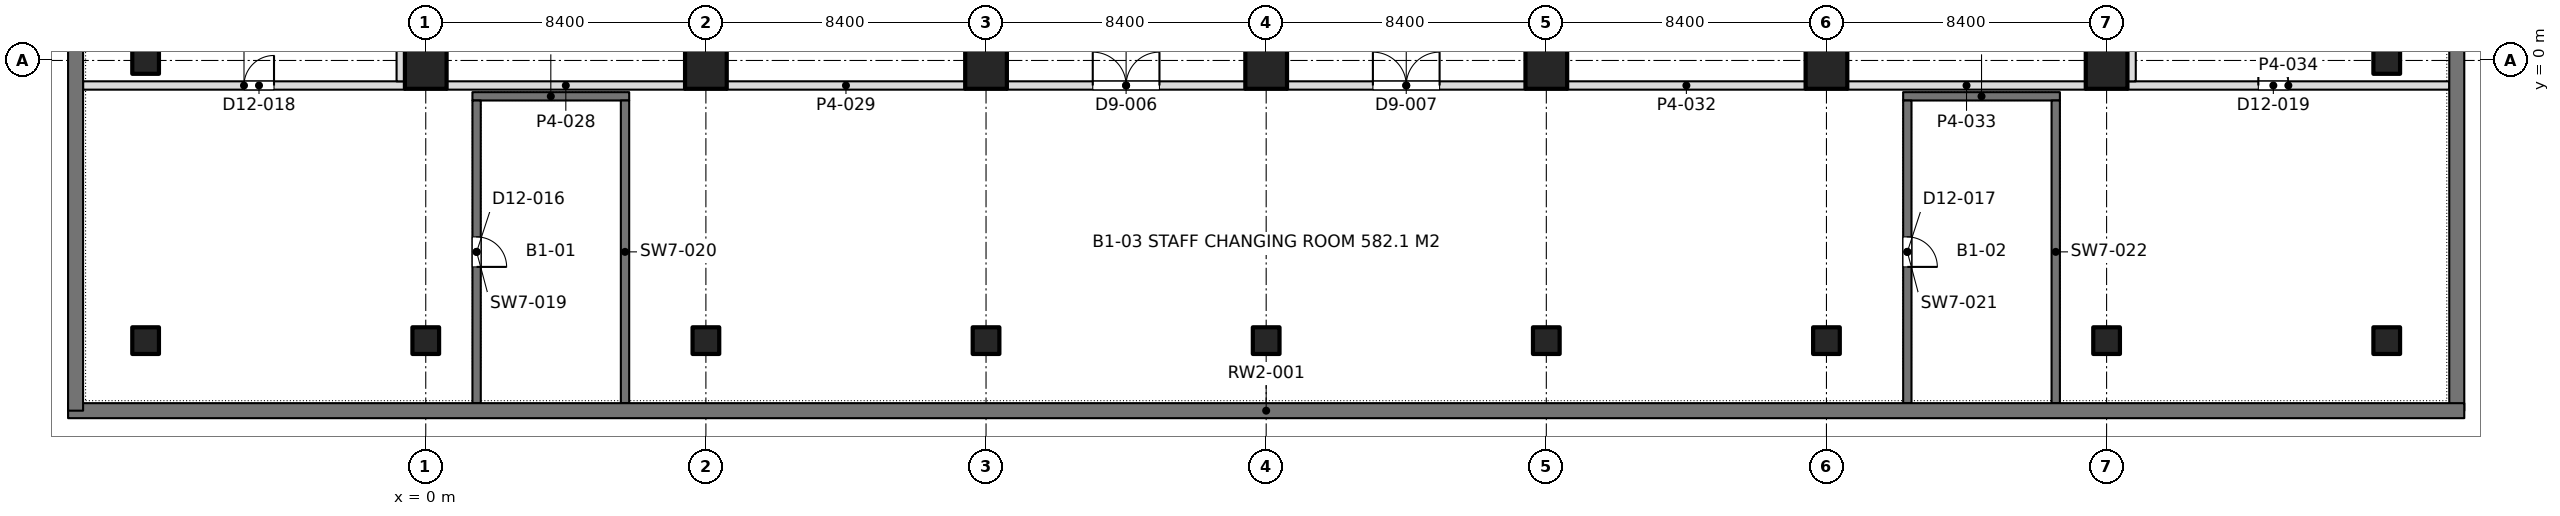
"""IFC4 building model, lengths in metres.
Left out: names, types, materials, properties, quantities, classifications, styles, units other than length and angle.
Written with IfcOpenShell. Run it as: python <this file> out.ifc"""

import sys

from ifc_helpers import new_model, si_unit, direction, frame, frame_2d, origin, origin_with_axes, origin_2d, place, context, subcontext, project, spatial, rectangle, extrude, element, fill, save


model = new_model("IFC4")
c1 = context("Model", 3, precision=1e-05, world=origin(), true_north=direction((0.0, 1.0)))
c2 = subcontext(c1, "Body", "Model", "MODEL_VIEW")
j1 = project(units=[si_unit("LENGTHUNIT", "METRE"), si_unit("PLANEANGLEUNIT", "RADIAN")], contexts=[c1])
p1 = place(None, origin())
s1 = spatial("IfcSite", under=j1, at=p1, CompositionType="ELEMENT")
p2 = place(p1, origin())
s2 = spatial("IfcBuilding", under=s1, at=p2, CompositionType="ELEMENT")
p3 = place(p2, frame((0.0, 0.0, -4.2)))
s3 = spatial("IfcBuildingStorey", under=s2, at=p3, CompositionType="ELEMENT", Elevation=-4.2)
p4 = place(p3, frame((-10.725, -10.5, 0.0), z_axis=(0.0, 0.0, 1.0), x_axis=(1.0, 0.0, 0.0)))
e1 = element("IfcWall", 1, at=p4, inside=s3, PredefinedType="SOLIDWALL", context=c2, shape_type="SweptSolid", body=[
    extrude(rectangle(XDim=71.85, YDim=0.45, at=frame_2d((35.925, 0.0))), origin(), (0.0, 0.0, 1.0), 4.2),
])
for number, where, z_axis, x_axis in (
    (2, (-10.5, -10.5, 0.0), (0.0, 0.0, 1.0), (0.0, 1.0, 0.0)),
    (3, (60.9, -10.5, 0.0), (0.0, 0.0, 1.0), (0.0, 1.0, 0.0)),
):
    element("IfcWall", number, at=place(p3, frame(where, z_axis=z_axis, x_axis=x_axis)), inside=s3, PredefinedType="SOLIDWALL", context=c2, shape_type="SweptSolid", body=[
        extrude(rectangle(XDim=71.4, YDim=0.45, at=frame_2d((35.7, 0.0))), origin(), (0.0, 0.0, 1.0), 4.2),
    ])
for number, where, z_axis, x_axis in (
    (4, (-8.4, -8.4, 0.0), (0.0, 0.0, 1.0), (1.0, 0.0, 0.0)),
    (5, (-8.4, 0.0, 0.0), (0.0, 0.0, 1.0), (1.0, 0.0, 0.0)),
    (6, (0.0, -8.4, 0.0), (0.0, 0.0, 1.0), (1.0, 0.0, 0.0)),
):
    element("IfcColumn", number, at=place(p3, frame(where, z_axis=z_axis, x_axis=x_axis)), inside=s3, PredefinedType="COLUMN", context=c2, shape_type="SweptSolid", body=[
        extrude(rectangle(XDim=0.8, YDim=0.8, at=origin_2d()), origin(), (0.0, 0.0, 1.0), 4.2),
    ])
p5 = place(p3, origin_with_axes())
e7 = element("IfcColumn", 7, at=p5, inside=s3, PredefinedType="COLUMN", context=c2, shape_type="SweptSolid", body=[
    extrude(rectangle(XDim=1.25, YDim=1.7, at=origin_2d()), origin(), (0.0, 0.0, 1.0), 4.2),
])
p6 = place(p3, frame((8.4, -8.4, 0.0), z_axis=(0.0, 0.0, 1.0), x_axis=(1.0, 0.0, 0.0)))
e8 = element("IfcColumn", 8, at=p6, inside=s3, PredefinedType="COLUMN", context=c2, shape_type="SweptSolid", body=[
    extrude(rectangle(XDim=0.8, YDim=0.8, at=origin_2d()), origin(), (0.0, 0.0, 1.0), 4.2),
])
p7 = place(p3, frame((8.4, 0.0, 0.0), z_axis=(0.0, 0.0, 1.0), x_axis=(1.0, 0.0, 0.0)))
e9 = element("IfcColumn", 9, at=p7, inside=s3, PredefinedType="COLUMN", context=c2, shape_type="SweptSolid", body=[
    extrude(rectangle(XDim=1.25, YDim=1.7, at=origin_2d()), origin(), (0.0, 0.0, 1.0), 4.2),
])
p8 = place(p3, frame((16.8, -8.4, 0.0), z_axis=(0.0, 0.0, 1.0), x_axis=(1.0, 0.0, 0.0)))
e10 = element("IfcColumn", 10, at=p8, inside=s3, PredefinedType="COLUMN", context=c2, shape_type="SweptSolid", body=[
    extrude(rectangle(XDim=0.8, YDim=0.8, at=origin_2d()), origin(), (0.0, 0.0, 1.0), 4.2),
])
p9 = place(p3, frame((16.8, 0.0, 0.0), z_axis=(0.0, 0.0, 1.0), x_axis=(1.0, 0.0, 0.0)))
e11 = element("IfcColumn", 11, at=p9, inside=s3, PredefinedType="COLUMN", context=c2, shape_type="SweptSolid", body=[
    extrude(rectangle(XDim=1.25, YDim=1.7, at=origin_2d()), origin(), (0.0, 0.0, 1.0), 4.2),
])
p10 = place(p3, frame((25.2, -8.4, 0.0), z_axis=(0.0, 0.0, 1.0), x_axis=(1.0, 0.0, 0.0)))
e12 = element("IfcColumn", 12, at=p10, inside=s3, PredefinedType="COLUMN", context=c2, shape_type="SweptSolid", body=[
    extrude(rectangle(XDim=0.8, YDim=0.8, at=origin_2d()), origin(), (0.0, 0.0, 1.0), 4.2),
])
p11 = place(p3, frame((25.2, 0.0, 0.0), z_axis=(0.0, 0.0, 1.0), x_axis=(1.0, 0.0, 0.0)))
e13 = element("IfcColumn", 13, at=p11, inside=s3, PredefinedType="COLUMN", context=c2, shape_type="SweptSolid", body=[
    extrude(rectangle(XDim=1.25, YDim=1.7, at=origin_2d()), origin(), (0.0, 0.0, 1.0), 4.2),
])
p12 = place(p3, frame((33.6, -8.4, 0.0), z_axis=(0.0, 0.0, 1.0), x_axis=(1.0, 0.0, 0.0)))
e14 = element("IfcColumn", 14, at=p12, inside=s3, PredefinedType="COLUMN", context=c2, shape_type="SweptSolid", body=[
    extrude(rectangle(XDim=0.8, YDim=0.8, at=origin_2d()), origin(), (0.0, 0.0, 1.0), 4.2),
])
p13 = place(p3, frame((33.6, 0.0, 0.0), z_axis=(0.0, 0.0, 1.0), x_axis=(1.0, 0.0, 0.0)))
e15 = element("IfcColumn", 15, at=p13, inside=s3, PredefinedType="COLUMN", context=c2, shape_type="SweptSolid", body=[
    extrude(rectangle(XDim=1.25, YDim=1.7, at=origin_2d()), origin(), (0.0, 0.0, 1.0), 4.2),
])
p14 = place(p3, frame((42.0, -8.4, 0.0), z_axis=(0.0, 0.0, 1.0), x_axis=(1.0, 0.0, 0.0)))
e16 = element("IfcColumn", 16, at=p14, inside=s3, PredefinedType="COLUMN", context=c2, shape_type="SweptSolid", body=[
    extrude(rectangle(XDim=0.8, YDim=0.8, at=origin_2d()), origin(), (0.0, 0.0, 1.0), 4.2),
])
p15 = place(p3, frame((42.0, 0.0, 0.0), z_axis=(0.0, 0.0, 1.0), x_axis=(1.0, 0.0, 0.0)))
e17 = element("IfcColumn", 17, at=p15, inside=s3, PredefinedType="COLUMN", context=c2, shape_type="SweptSolid", body=[
    extrude(rectangle(XDim=1.25, YDim=1.7, at=origin_2d()), origin(), (0.0, 0.0, 1.0), 4.2),
])
p16 = place(p3, frame((50.4, -8.4, 0.0), z_axis=(0.0, 0.0, 1.0), x_axis=(1.0, 0.0, 0.0)))
e18 = element("IfcColumn", 18, at=p16, inside=s3, PredefinedType="COLUMN", context=c2, shape_type="SweptSolid", body=[
    extrude(rectangle(XDim=0.8, YDim=0.8, at=origin_2d()), origin(), (0.0, 0.0, 1.0), 4.2),
])
p17 = place(p3, frame((50.4, 0.0, 0.0), z_axis=(0.0, 0.0, 1.0), x_axis=(1.0, 0.0, 0.0)))
e19 = element("IfcColumn", 19, at=p17, inside=s3, PredefinedType="COLUMN", context=c2, shape_type="SweptSolid", body=[
    extrude(rectangle(XDim=1.25, YDim=1.7, at=origin_2d()), origin(), (0.0, 0.0, 1.0), 4.2),
])
for number, where, z_axis, x_axis in (
    (20, (58.8, -8.4, 0.0), (0.0, 0.0, 1.0), (1.0, 0.0, 0.0)),
    (21, (58.8, 0.0, 0.0), (0.0, 0.0, 1.0), (1.0, 0.0, 0.0)),
):
    element("IfcColumn", number, at=place(p3, frame(where, z_axis=z_axis, x_axis=x_axis)), inside=s3, PredefinedType="COLUMN", context=c2, shape_type="SweptSolid", body=[
        extrude(rectangle(XDim=0.8, YDim=0.8, at=origin_2d()), origin(), (0.0, 0.0, 1.0), 4.2),
    ])
p18 = place(p3, frame((-10.276, -0.75, 0.0), z_axis=(0.0, 0.0, 1.0), x_axis=(1.0, 0.0, 0.0)))
e22 = element("IfcWall", 22, at=p18, inside=s3, PredefinedType="PARTITIONING", context=c2, shape_type="SweptSolid", body=[
    extrude(rectangle(XDim=9.652, YDim=0.25, at=frame_2d((4.826, 0.0))), origin(), (0.0, 0.0, 1.0), 3.8),
])
p19 = place(p18, frame((4.826, 0.0, 0.0)))
e23 = element("IfcOpeningElement", 23, at=p19, cuts=e22, PredefinedType="OPENING", context=c2, shape_type="SweptSolid", body=[
    extrude(rectangle(XDim=0.9, YDim=2.2, at=frame_2d((0.45, 1.1))), frame((0.0, 0.135, 0.0), z_axis=(0.0, -1.0, 0.0), x_axis=(1.0, 0.0, 0.0)), (0.0, 0.0, 1.0), 0.27),
])
p20 = place(p3, frame((0.624, -0.75, 0.0), z_axis=(0.0, 0.0, 1.0), x_axis=(1.0, 0.0, 0.0)))
e24 = element("IfcWall", 24, at=p20, inside=s3, PredefinedType="PARTITIONING", context=c2, shape_type="SweptSolid", body=[
    extrude(rectangle(XDim=7.152, YDim=0.25, at=frame_2d((3.576, 0.0))), origin(), (0.0, 0.0, 1.0), 3.8),
])
p21 = place(p3, frame((9.024, -0.75, 0.0), z_axis=(0.0, 0.0, 1.0), x_axis=(1.0, 0.0, 0.0)))
e25 = element("IfcWall", 25, at=p21, inside=s3, PredefinedType="PARTITIONING", context=c2, shape_type="SweptSolid", body=[
    extrude(rectangle(XDim=7.152, YDim=0.25, at=frame_2d((3.576, 0.0))), origin(), (0.0, 0.0, 1.0), 3.8),
])
p22 = place(p3, frame((17.424, -0.75, 0.0), z_axis=(0.0, 0.0, 1.0), x_axis=(1.0, 0.0, 0.0)))
e26 = element("IfcWall", 26, at=p22, inside=s3, PredefinedType="PARTITIONING", context=c2, shape_type="SweptSolid", body=[
    extrude(rectangle(XDim=7.152, YDim=0.25, at=frame_2d((3.576, 0.0))), origin(), (0.0, 0.0, 1.0), 3.8),
])
p23 = place(p22, frame((2.576, 0.0, 0.0)))
e27 = element("IfcOpeningElement", 27, at=p23, cuts=e26, PredefinedType="OPENING", context=c2, shape_type="SweptSolid", body=[
    extrude(rectangle(XDim=2.0, YDim=2.4, at=frame_2d((1.0, 1.2))), frame((0.0, 0.135, 0.0), z_axis=(0.0, -1.0, 0.0), x_axis=(1.0, 0.0, 0.0)), (0.0, 0.0, 1.0), 0.27),
])
p24 = place(p3, frame((25.824, -0.75, 0.0), z_axis=(0.0, 0.0, 1.0), x_axis=(1.0, 0.0, 0.0)))
e28 = element("IfcWall", 28, at=p24, inside=s3, PredefinedType="PARTITIONING", context=c2, shape_type="SweptSolid", body=[
    extrude(rectangle(XDim=7.152, YDim=0.25, at=frame_2d((3.576, 0.0))), origin(), (0.0, 0.0, 1.0), 3.8),
])
p25 = place(p24, frame((2.576, 0.0, 0.0)))
e29 = element("IfcOpeningElement", 29, at=p25, cuts=e28, PredefinedType="OPENING", context=c2, shape_type="SweptSolid", body=[
    extrude(rectangle(XDim=2.0, YDim=2.4, at=frame_2d((1.0, 1.2))), frame((0.0, 0.135, 0.0), z_axis=(0.0, -1.0, 0.0), x_axis=(1.0, 0.0, 0.0)), (0.0, 0.0, 1.0), 0.27),
])
for number, where, z_axis, x_axis in (
    (30, (34.224, -0.75, 0.0), (0.0, 0.0, 1.0), (1.0, 0.0, 0.0)),
    (31, (42.624, -0.75, 0.0), (0.0, 0.0, 1.0), (1.0, 0.0, 0.0)),
):
    element("IfcWall", number, at=place(p3, frame(where, z_axis=z_axis, x_axis=x_axis)), inside=s3, PredefinedType="PARTITIONING", context=c2, shape_type="SweptSolid", body=[
        extrude(rectangle(XDim=7.152, YDim=0.25, at=frame_2d((3.576, 0.0))), origin(), (0.0, 0.0, 1.0), 3.8),
    ])
p26 = place(p3, frame((51.024, -0.75, 0.0), z_axis=(0.0, 0.0, 1.0), x_axis=(1.0, 0.0, 0.0)))
e32 = element("IfcWall", 32, at=p26, inside=s3, PredefinedType="PARTITIONING", context=c2, shape_type="SweptSolid", body=[
    extrude(rectangle(XDim=9.652, YDim=0.25, at=frame_2d((4.826, 0.0))), origin(), (0.0, 0.0, 1.0), 3.8),
])
p27 = place(p26, frame((3.926, 0.0, 0.0)))
e33 = element("IfcOpeningElement", 33, at=p27, cuts=e32, PredefinedType="OPENING", context=c2, shape_type="SweptSolid", body=[
    extrude(rectangle(XDim=0.9, YDim=2.2, at=frame_2d((0.45, 1.1))), frame((0.0, 0.135, 0.0), z_axis=(0.0, -1.0, 0.0), x_axis=(1.0, 0.0, 0.0)), (0.0, 0.0, 1.0), 0.27),
])
p28 = place(p3, frame((-0.75, -0.626, 0.0), z_axis=(0.0, 0.0, 1.0), x_axis=(0.0, 1.0, 0.0)))
e34 = element("IfcWall", 34, at=p28, inside=s3, PredefinedType="PARTITIONING", context=c2, shape_type="SweptSolid", body=[
    extrude(rectangle(XDim=8.377, YDim=0.25, at=frame_2d((4.188, 0.0))), origin(), (0.0, 0.0, 1.0), 3.8),
])
p29 = place(p28, frame((4.376, 0.0, 0.0)))
e35 = element("IfcOpeningElement", 35, at=p29, cuts=e34, PredefinedType="OPENING", context=c2, shape_type="SweptSolid", body=[
    extrude(rectangle(XDim=0.9, YDim=2.2, at=frame_2d((0.45, 1.1))), frame((0.0, 0.135, 0.0), z_axis=(0.0, -1.0, 0.0), x_axis=(1.0, 0.0, 0.0)), (0.0, 0.0, 1.0), 0.27),
])
p30 = place(p3, frame((51.15, -0.626, 0.0), z_axis=(0.0, 0.0, 1.0), x_axis=(0.0, 1.0, 0.0)))
e36 = element("IfcWall", 36, at=p30, inside=s3, PredefinedType="PARTITIONING", context=c2, shape_type="SweptSolid", body=[
    extrude(rectangle(XDim=8.377, YDim=0.25, at=frame_2d((4.188, 0.0))), origin(), (0.0, 0.0, 1.0), 3.8),
])
p31 = place(p3, frame((1.525, -10.277, 0.0), z_axis=(0.0, 0.0, 1.0), x_axis=(0.0, 1.0, 0.0)))
e37 = element("IfcWall", 37, at=p31, inside=s3, PredefinedType="SOLIDWALL", context=c2, shape_type="SweptSolid", body=[
    extrude(rectangle(XDim=9.077, YDim=0.25, at=frame_2d((4.539, 0.0))), origin(), (0.0, 0.0, 1.0), 4.2),
])
p32 = place(p31, frame((4.087, 0.0, 0.0)))
e38 = element("IfcOpeningElement", 38, at=p32, cuts=e37, PredefinedType="OPENING", context=c2, shape_type="SweptSolid", body=[
    extrude(rectangle(XDim=0.9, YDim=2.2, at=frame_2d((0.45, 1.1))), frame((0.0, 0.135, 0.0), z_axis=(0.0, -1.0, 0.0), x_axis=(1.0, 0.0, 0.0)), (0.0, 0.0, 1.0), 0.27),
])
p33 = place(p3, frame((5.975, -10.277, 0.0), z_axis=(0.0, 0.0, 1.0), x_axis=(0.0, 1.0, 0.0)))
e39 = element("IfcWall", 39, at=p33, inside=s3, PredefinedType="SOLIDWALL", context=c2, shape_type="SweptSolid", body=[
    extrude(rectangle(XDim=9.077, YDim=0.25, at=frame_2d((4.539, 0.0))), origin(), (0.0, 0.0, 1.0), 4.2),
])
p34 = place(p3, frame((1.4, -1.075, 0.0), z_axis=(0.0, 0.0, 1.0), x_axis=(1.0, 0.0, 0.0)))
e40 = element("IfcWall", 40, at=p34, inside=s3, PredefinedType="SOLIDWALL", context=c2, shape_type="SweptSolid", body=[
    extrude(rectangle(XDim=4.7, YDim=0.25, at=frame_2d((2.35, 0.0))), origin(), (0.0, 0.0, 1.0), 4.2),
])
p35 = place(p3, frame((44.425, -10.277, 0.0), z_axis=(0.0, 0.0, 1.0), x_axis=(0.0, 1.0, 0.0)))
e41 = element("IfcWall", 41, at=p35, inside=s3, PredefinedType="SOLIDWALL", context=c2, shape_type="SweptSolid", body=[
    extrude(rectangle(XDim=9.077, YDim=0.25, at=frame_2d((4.539, 0.0))), origin(), (0.0, 0.0, 1.0), 4.2),
])
p36 = place(p35, frame((4.087, 0.0, 0.0)))
e42 = element("IfcOpeningElement", 42, at=p36, cuts=e41, PredefinedType="OPENING", context=c2, shape_type="SweptSolid", body=[
    extrude(rectangle(XDim=0.9, YDim=2.2, at=frame_2d((0.45, 1.1))), frame((0.0, 0.135, 0.0), z_axis=(0.0, -1.0, 0.0), x_axis=(1.0, 0.0, 0.0)), (0.0, 0.0, 1.0), 0.27),
])
p37 = place(p3, frame((48.875, -10.277, 0.0), z_axis=(0.0, 0.0, 1.0), x_axis=(0.0, 1.0, 0.0)))
e43 = element("IfcWall", 43, at=p37, inside=s3, PredefinedType="SOLIDWALL", context=c2, shape_type="SweptSolid", body=[
    extrude(rectangle(XDim=9.077, YDim=0.25, at=frame_2d((4.539, 0.0))), origin(), (0.0, 0.0, 1.0), 4.2),
])
p38 = place(p3, frame((44.3, -1.075, 0.0), z_axis=(0.0, 0.0, 1.0), x_axis=(1.0, 0.0, 0.0)))
e44 = element("IfcWall", 44, at=p38, inside=s3, PredefinedType="SOLIDWALL", context=c2, shape_type="SweptSolid", body=[
    extrude(rectangle(XDim=4.7, YDim=0.25, at=frame_2d((2.35, 0.0))), origin(), (0.0, 0.0, 1.0), 4.2),
])
p39 = place(p19, origin())
e45 = element("IfcDoor", 45, at=p39, inside=s3, OperationType="SINGLE_SWING_RIGHT", PredefinedType="DOOR", context=c2, shape_type="SweptSolid", body=[
    extrude(rectangle(XDim=0.9, YDim=2.2, at=frame_2d((0.45, 1.1))), frame((0.0, 0.025, 0.0), z_axis=(0.0, -1.0, 0.0), x_axis=(1.0, 0.0, 0.0)), (0.0, 0.0, 1.0), 0.05),
])
fill(e23, e45)
p40 = place(p23, origin())
e46 = element("IfcDoor", 46, at=p40, inside=s3, OperationType="DOUBLE_DOOR_SINGLE_SWING", PredefinedType="DOOR", context=c2, shape_type="SweptSolid", body=[
    extrude(rectangle(XDim=2.0, YDim=2.4, at=frame_2d((1.0, 1.2))), frame((0.0, 0.025, 0.0), z_axis=(0.0, -1.0, 0.0), x_axis=(1.0, 0.0, 0.0)), (0.0, 0.0, 1.0), 0.05),
])
fill(e27, e46)
p41 = place(p25, origin())
e47 = element("IfcDoor", 47, at=p41, inside=s3, OperationType="DOUBLE_DOOR_SINGLE_SWING", PredefinedType="DOOR", context=c2, shape_type="SweptSolid", body=[
    extrude(rectangle(XDim=2.0, YDim=2.4, at=frame_2d((1.0, 1.2))), frame((0.0, 0.025, 0.0), z_axis=(0.0, -1.0, 0.0), x_axis=(1.0, 0.0, 0.0)), (0.0, 0.0, 1.0), 0.05),
])
fill(e29, e47)
p42 = place(p27, origin())
e48 = element("IfcDoor", 48, at=p42, inside=s3, OperationType="SINGLE_SWING_LEFT", PredefinedType="DOOR", context=c2, shape_type="SweptSolid", body=[
    extrude(rectangle(XDim=0.9, YDim=2.2, at=frame_2d((0.45, 1.1))), frame((0.0, 0.025, 0.0), z_axis=(0.0, -1.0, 0.0), x_axis=(1.0, 0.0, 0.0)), (0.0, 0.0, 1.0), 0.05),
])
fill(e33, e48)
p43 = place(p32, frame((0.9, 0.0, 0.0), z_axis=(0.0, 0.0, 1.0), x_axis=(-1.0, 0.0, 0.0)))
e49 = element("IfcDoor", 49, at=p43, inside=s3, OperationType="SINGLE_SWING_RIGHT", PredefinedType="DOOR", context=c2, shape_type="SweptSolid", body=[
    extrude(rectangle(XDim=0.9, YDim=2.2, at=frame_2d((0.45, 1.1))), frame((0.0, 0.025, 0.0), z_axis=(0.0, -1.0, 0.0), x_axis=(1.0, 0.0, 0.0)), (0.0, 0.0, 1.0), 0.05),
])
fill(e38, e49)
p44 = place(p36, frame((0.9, 0.0, 0.0), z_axis=(0.0, 0.0, 1.0), x_axis=(-1.0, 0.0, 0.0)))
e50 = element("IfcDoor", 50, at=p44, inside=s3, OperationType="SINGLE_SWING_RIGHT", PredefinedType="DOOR", context=c2, shape_type="SweptSolid", body=[
    extrude(rectangle(XDim=0.9, YDim=2.2, at=frame_2d((0.45, 1.1))), frame((0.0, 0.025, 0.0), z_axis=(0.0, -1.0, 0.0), x_axis=(1.0, 0.0, 0.0)), (0.0, 0.0, 1.0), 0.05),
])
fill(e42, e50)
save(model, sys.argv[1])
